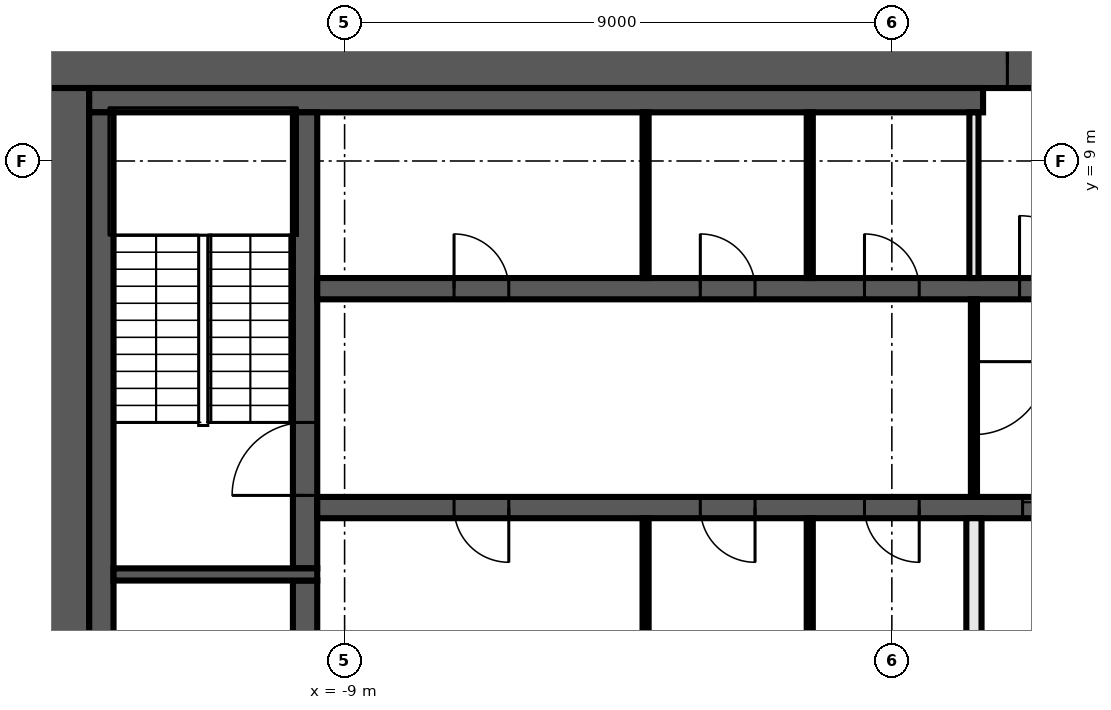
"""IFC4 building model, lengths in metres.
Left out: names, types, materials, properties, quantities, classifications, styles, units other than length and angle.
Written with IfcOpenShell. Run it as: python <this file> out.ifc"""

import sys

from ifc_helpers import new_model, si_unit, direction, frame, frame_2d, origin, place, context, subcontext, project, spatial, rectangle, extrude, element, fill, save


model = new_model("IFC4")
c1 = context("Model", 3, precision=1e-05, world=origin(), true_north=direction((0.0, 1.0)))
c2 = subcontext(c1, "Body", "Model", "MODEL_VIEW")
j1 = project(units=[si_unit("LENGTHUNIT", "METRE"), si_unit("PLANEANGLEUNIT", "RADIAN")], contexts=[c1])
p1 = place(None, origin())
s1 = spatial("IfcSite", under=j1, at=p1, CompositionType="ELEMENT")
p2 = place(p1, origin())
s2 = spatial("IfcBuilding", under=s1, at=p2, CompositionType="ELEMENT")
p3 = place(p2, frame((0.0, 0.0, 167.0)))
s3 = spatial("IfcBuildingStorey", under=s2, at=p3, CompositionType="ELEMENT", Elevation=167.0)
p4 = place(p3, frame((-14.0, 10.6, 0.0), z_axis=(0.0, 0.0, 1.0), x_axis=(1.0, 0.0, 0.0)))
e1 = element("IfcWall", 1, at=p4, inside=s3, PredefinedType="SHEAR", context=c2, shape_type="SweptSolid", body=[
    extrude(rectangle(XDim=28.0, YDim=0.8, at=frame_2d((14.0, 0.0))), origin(), (0.0, 0.0, 1.0), 3.82),
])
p5 = place(p4, frame((15.9, 0.0, 0.0)))
e2 = element("IfcOpeningElement", 2, at=p5, cuts=e1, PredefinedType="OPENING", context=c2, shape_type="SweptSolid", body=[
    extrude(rectangle(XDim=1.6, YDim=2.1, at=frame_2d((0.8, 1.05))), frame((0.0, 0.41, 0.0), z_axis=(0.0, -1.0, 0.0), x_axis=(1.0, 0.0, 0.0)), (0.0, 0.0, 1.0), 0.82),
])
p6 = place(p3, frame((-13.6, -10.2, 0.0), z_axis=(0.0, 0.0, 1.0), x_axis=(0.0, 1.0, 0.0)))
e3 = element("IfcWall", 3, at=p6, inside=s3, PredefinedType="SHEAR", context=c2, shape_type="SweptSolid", body=[
    extrude(rectangle(XDim=20.4, YDim=0.8, at=frame_2d((10.2, 0.0))), origin(), (0.0, 0.0, 1.0), 3.82),
])
p7 = place(p3, frame((-13.2, 10.0, 0.0), z_axis=(0.0, 0.0, 1.0), x_axis=(1.0, 0.0, 0.0)))
e4 = element("IfcWall", 4, at=p7, inside=s3, PredefinedType="SHEAR", context=c2, shape_type="SweptSolid", body=[
    extrude(rectangle(XDim=14.7, YDim=0.4, at=frame_2d((7.35, 0.0))), origin(), (0.0, 0.0, 1.0), 3.82),
])
p8 = place(p3, frame((-13.0, -9.8, 0.0), z_axis=(0.0, 0.0, 1.0), x_axis=(0.0, 1.0, 0.0)))
e5 = element("IfcWall", 5, at=p8, inside=s3, PredefinedType="SHEAR", context=c2, shape_type="SweptSolid", body=[
    extrude(rectangle(XDim=19.6, YDim=0.4, at=frame_2d((9.8, 0.0))), origin(), (0.0, 0.0, 1.0), 3.82),
])
p9 = place(p3, frame((-9.65, -2.1, 0.0), z_axis=(0.0, 0.0, 1.0), x_axis=(0.0, 1.0, 0.0)))
e6 = element("IfcWall", 6, at=p9, inside=s3, PredefinedType="SHEAR", context=c2, shape_type="SweptSolid", body=[
    extrude(rectangle(XDim=4.2, YDim=0.4, at=frame_2d((2.1, 0.0))), origin(), (0.0, 0.0, 1.0), 3.82),
])
p10 = place(p3, frame((-9.65, 2.3, 0.0), z_axis=(0.0, 0.0, 1.0), x_axis=(0.0, 1.0, 0.0)))
e7 = element("IfcWall", 7, at=p10, inside=s3, PredefinedType="SHEAR", context=c2, shape_type="SweptSolid", body=[
    extrude(rectangle(XDim=7.5, YDim=0.4, at=frame_2d((3.75, 0.0))), origin(), (0.0, 0.0, 1.0), 3.82),
])
p11 = place(p10, frame((1.2, 0.0, 0.0)))
e8 = element("IfcOpeningElement", 8, at=p11, cuts=e7, PredefinedType="OPENING", context=c2, shape_type="SweptSolid", body=[
    extrude(rectangle(XDim=1.2, YDim=2.1, at=frame_2d((0.6, 1.05))), frame((0.0, 0.21, 0.0), z_axis=(0.0, -1.0, 0.0), x_axis=(1.0, 0.0, 0.0)), (0.0, 0.0, 1.0), 0.42),
])
p12 = place(p3, frame((-9.45, 2.2, 0.0), z_axis=(0.0, 0.0, 1.0), x_axis=(-1.0, 0.0, 0.0)))
e9 = element("IfcWall", 9, at=p12, inside=s3, PredefinedType="SHEAR", context=c2, shape_type="SweptSolid", body=[
    extrude(rectangle(XDim=3.35, YDim=0.2, at=frame_2d((1.675, 0.0))), origin(), (0.0, 0.0, 1.0), 3.82),
])
p13 = place(p3, frame((-9.45, 6.9, 0.0), z_axis=(0.0, 0.0, 1.0), x_axis=(1.0, 0.0, 0.0)))
e10 = element("IfcWall", 10, at=p13, inside=s3, PredefinedType="SHEAR", context=c2, shape_type="SweptSolid", body=[
    extrude(rectangle(XDim=18.9, YDim=0.35, at=frame_2d((9.45, 0.0))), origin(), (0.0, 0.0, 1.0), 3.82),
])
p14 = place(p13, frame((11.55, 0.0, 0.0)))
e11 = element("IfcOpeningElement", 11, at=p14, cuts=e10, PredefinedType="OPENING", context=c2, shape_type="SweptSolid", body=[
    extrude(rectangle(XDim=1.2, YDim=2.1, at=frame_2d((0.6, 1.05))), frame((0.0, 0.185, 0.0), z_axis=(0.0, -1.0, 0.0), x_axis=(1.0, 0.0, 0.0)), (0.0, 0.0, 1.0), 0.37),
])
p15 = place(p13, frame((14.3, 0.0, 0.0)))
e12 = element("IfcOpeningElement", 12, at=p15, cuts=e10, PredefinedType="OPENING", context=c2, shape_type="SweptSolid", body=[
    extrude(rectangle(XDim=1.1, YDim=2.1, at=frame_2d((0.55, 1.05))), frame((0.0, 0.185, 0.0), z_axis=(0.0, -1.0, 0.0), x_axis=(1.0, 0.0, 0.0)), (0.0, 0.0, 1.0), 0.37),
])
p16 = place(p13, frame((17.0, 0.0, 0.0)))
e13 = element("IfcOpeningElement", 13, at=p16, cuts=e10, PredefinedType="OPENING", context=c2, shape_type="SweptSolid", body=[
    extrude(rectangle(XDim=1.1, YDim=2.1, at=frame_2d((0.55, 1.05))), frame((0.0, 0.185, 0.0), z_axis=(0.0, -1.0, 0.0), x_axis=(1.0, 0.0, 0.0)), (0.0, 0.0, 1.0), 0.37),
])
p17 = place(p13, frame((2.25, 0.0, 0.0)))
e14 = element("IfcOpeningElement", 14, at=p17, cuts=e10, PredefinedType="OPENING", context=c2, shape_type="SweptSolid", body=[
    extrude(rectangle(XDim=0.9, YDim=2.1, at=frame_2d((0.45, 1.05))), frame((0.0, 0.185, 0.0), z_axis=(0.0, -1.0, 0.0), x_axis=(1.0, 0.0, 0.0)), (0.0, 0.0, 1.0), 0.37),
])
p18 = place(p13, frame((6.3, 0.0, 0.0)))
e15 = element("IfcOpeningElement", 15, at=p18, cuts=e10, PredefinedType="OPENING", context=c2, shape_type="SweptSolid", body=[
    extrude(rectangle(XDim=0.9, YDim=2.1, at=frame_2d((0.45, 1.05))), frame((0.0, 0.185, 0.0), z_axis=(0.0, -1.0, 0.0), x_axis=(1.0, 0.0, 0.0)), (0.0, 0.0, 1.0), 0.37),
])
p19 = place(p13, frame((9.0, 0.0, 0.0)))
e16 = element("IfcOpeningElement", 16, at=p19, cuts=e10, PredefinedType="OPENING", context=c2, shape_type="SweptSolid", body=[
    extrude(rectangle(XDim=0.9, YDim=2.1, at=frame_2d((0.45, 1.05))), frame((0.0, 0.185, 0.0), z_axis=(0.0, -1.0, 0.0), x_axis=(1.0, 0.0, 0.0)), (0.0, 0.0, 1.0), 0.37),
])
p20 = place(p3, frame((9.45, 3.3, 0.0), z_axis=(0.0, 0.0, 1.0), x_axis=(-1.0, 0.0, 0.0)))
e17 = element("IfcWall", 17, at=p20, inside=s3, PredefinedType="SHEAR", context=c2, shape_type="SweptSolid", body=[
    extrude(rectangle(XDim=18.9, YDim=0.35, at=frame_2d((9.45, 0.0))), origin(), (0.0, 0.0, 1.0), 3.82),
])
p21 = place(p20, frame((6.2, 0.0, 0.0)))
e18 = element("IfcOpeningElement", 18, at=p21, cuts=e17, PredefinedType="OPENING", context=c2, shape_type="SweptSolid", body=[
    extrude(rectangle(XDim=1.1, YDim=2.1, at=frame_2d((0.55, 1.05))), frame((0.0, 0.185, 0.0), z_axis=(0.0, -1.0, 0.0), x_axis=(1.0, 0.0, 0.0)), (0.0, 0.0, 1.0), 0.37),
])
p22 = place(p20, frame((3.5, 0.0, 0.0)))
e19 = element("IfcOpeningElement", 19, at=p22, cuts=e17, PredefinedType="OPENING", context=c2, shape_type="SweptSolid", body=[
    extrude(rectangle(XDim=1.1, YDim=2.1, at=frame_2d((0.55, 1.05))), frame((0.0, 0.185, 0.0), z_axis=(0.0, -1.0, 0.0), x_axis=(1.0, 0.0, 0.0)), (0.0, 0.0, 1.0), 0.37),
])
p23 = place(p20, frame((0.9, 0.0, 0.0)))
e20 = element("IfcOpeningElement", 20, at=p23, cuts=e17, PredefinedType="OPENING", context=c2, shape_type="SweptSolid", body=[
    extrude(rectangle(XDim=0.9, YDim=2.1, at=frame_2d((0.45, 1.05))), frame((0.0, 0.185, 0.0), z_axis=(0.0, -1.0, 0.0), x_axis=(1.0, 0.0, 0.0)), (0.0, 0.0, 1.0), 0.37),
])
p24 = place(p20, frame((15.75, 0.0, 0.0)))
e21 = element("IfcOpeningElement", 21, at=p24, cuts=e17, PredefinedType="OPENING", context=c2, shape_type="SweptSolid", body=[
    extrude(rectangle(XDim=0.9, YDim=2.1, at=frame_2d((0.45, 1.05))), frame((0.0, 0.185, 0.0), z_axis=(0.0, -1.0, 0.0), x_axis=(1.0, 0.0, 0.0)), (0.0, 0.0, 1.0), 0.37),
])
p25 = place(p20, frame((11.7, 0.0, 0.0)))
e22 = element("IfcOpeningElement", 22, at=p25, cuts=e17, PredefinedType="OPENING", context=c2, shape_type="SweptSolid", body=[
    extrude(rectangle(XDim=0.9, YDim=2.1, at=frame_2d((0.45, 1.05))), frame((0.0, 0.185, 0.0), z_axis=(0.0, -1.0, 0.0), x_axis=(1.0, 0.0, 0.0)), (0.0, 0.0, 1.0), 0.37),
])
p26 = place(p20, frame((9.0, 0.0, 0.0)))
e23 = element("IfcOpeningElement", 23, at=p26, cuts=e17, PredefinedType="OPENING", context=c2, shape_type="SweptSolid", body=[
    extrude(rectangle(XDim=0.9, YDim=2.1, at=frame_2d((0.45, 1.05))), frame((0.0, 0.185, 0.0), z_axis=(0.0, -1.0, 0.0), x_axis=(1.0, 0.0, 0.0)), (0.0, 0.0, 1.0), 0.37),
])
p27 = place(p3, frame((1.35, 7.075, 0.0), z_axis=(0.0, 0.0, 1.0), x_axis=(0.0, 1.0, 0.0)))
e24 = element("IfcWall", 24, at=p27, inside=s3, PredefinedType="PARTITIONING", context=c2, shape_type="SweptSolid", body=[
    extrude(rectangle(XDim=2.725, YDim=0.15, at=frame_2d((1.363, 0.0))), origin(), (0.0, 0.0, 1.0), 3.82),
])
p28 = place(p3, frame((1.35, 6.725, 0.0), z_axis=(0.0, 0.0, 1.0), x_axis=(0.0, -1.0, 0.0)))
e25 = element("IfcWall", 25, at=p28, inside=s3, PredefinedType="PARTITIONING", context=c2, shape_type="SweptSolid", body=[
    extrude(rectangle(XDim=3.25, YDim=0.1, at=frame_2d((1.625, 0.0))), origin(), (0.0, 0.0, 1.0), 3.82),
])
p29 = place(p28, frame((1.025, 0.0, 0.0)))
e26 = element("IfcOpeningElement", 26, at=p29, cuts=e25, PredefinedType="OPENING", context=c2, shape_type="SweptSolid", body=[
    extrude(rectangle(XDim=1.2, YDim=2.1, at=frame_2d((0.6, 1.05))), frame((0.0, 0.06, 0.0), z_axis=(0.0, -1.0, 0.0), x_axis=(1.0, 0.0, 0.0)), (0.0, 0.0, 1.0), 0.12),
])
p30 = place(p3, frame((1.35, 0.4, 0.0), z_axis=(0.0, 0.0, 1.0), x_axis=(0.0, 1.0, 0.0)))
e27 = element("IfcWall", 27, at=p30, inside=s3, PredefinedType="SOLIDWALL", context=c2, shape_type="SweptSolid", body=[
    extrude(rectangle(XDim=2.725, YDim=0.25, at=frame_2d((1.363, 0.0))), origin(), (0.0, 0.0, 1.0), 3.82),
])
for number, where, z_axis, x_axis in (
    (28, (-1.35, 0.4, 0.0), (0.0, 0.0, 1.0), (0.0, 1.0, 0.0)),
    (29, (-1.35, 7.075, 0.0), (0.0, 0.0, 1.0), (0.0, 1.0, 0.0)),
    (30, (-4.05, 0.4, 0.0), (0.0, 0.0, 1.0), (0.0, 1.0, 0.0)),
    (31, (-4.05, 7.075, 0.0), (0.0, 0.0, 1.0), (0.0, 1.0, 0.0)),
):
    element("IfcWall", number, at=place(p3, frame(where, z_axis=z_axis, x_axis=x_axis)), inside=s3, PredefinedType="PARTITIONING", context=c2, shape_type="SweptSolid", body=[
        extrude(rectangle(XDim=2.725, YDim=0.1, at=frame_2d((1.363, 0.0))), origin(), (0.0, 0.0, 1.0), 3.82),
    ])
p31 = place(p5, origin())
e32 = element("IfcDoor", 32, at=p31, inside=s3, OperationType="DOUBLE_DOOR_SINGLE_SWING", PredefinedType="DOOR", context=c2, shape_type="SweptSolid", body=[
    extrude(rectangle(XDim=1.6, YDim=2.1, at=frame_2d((0.8, 1.05))), frame((0.0, 0.025, 0.0), z_axis=(0.0, -1.0, 0.0), x_axis=(1.0, 0.0, 0.0)), (0.0, 0.0, 1.0), 0.05),
])
fill(e2, e32)
p32 = place(p14, origin())
e33 = element("IfcDoor", 33, at=p32, inside=s3, OperationType="SINGLE_SWING_LEFT", PredefinedType="DOOR", context=c2, shape_type="SweptSolid", body=[
    extrude(rectangle(XDim=1.2, YDim=2.1, at=frame_2d((0.6, 1.05))), frame((0.0, 0.025, 0.0), z_axis=(0.0, -1.0, 0.0), x_axis=(1.0, 0.0, 0.0)), (0.0, 0.0, 1.0), 0.05),
])
fill(e11, e33)
p33 = place(p21, origin())
e34 = element("IfcDoor", 34, at=p33, inside=s3, OperationType="DOUBLE_DOOR_SLIDING", PredefinedType="DOOR", context=c2, shape_type="SweptSolid", body=[
    extrude(rectangle(XDim=1.1, YDim=2.1, at=frame_2d((0.55, 1.05))), frame((0.0, 0.025, 0.0), z_axis=(0.0, -1.0, 0.0), x_axis=(1.0, 0.0, 0.0)), (0.0, 0.0, 1.0), 0.05),
])
fill(e18, e34)
p34 = place(p17, origin())
e35 = element("IfcDoor", 35, at=p34, inside=s3, OperationType="SINGLE_SWING_RIGHT", PredefinedType="DOOR", context=c2, shape_type="SweptSolid", body=[
    extrude(rectangle(XDim=0.9, YDim=2.1, at=frame_2d((0.45, 1.05))), frame((0.0, 0.025, 0.0), z_axis=(0.0, -1.0, 0.0), x_axis=(1.0, 0.0, 0.0)), (0.0, 0.0, 1.0), 0.05),
])
fill(e14, e35)
p35 = place(p18, origin())
e36 = element("IfcDoor", 36, at=p35, inside=s3, OperationType="SINGLE_SWING_LEFT", PredefinedType="DOOR", context=c2, shape_type="SweptSolid", body=[
    extrude(rectangle(XDim=0.9, YDim=2.1, at=frame_2d((0.45, 1.05))), frame((0.0, 0.025, 0.0), z_axis=(0.0, -1.0, 0.0), x_axis=(1.0, 0.0, 0.0)), (0.0, 0.0, 1.0), 0.05),
])
fill(e15, e36)
p36 = place(p19, origin())
e37 = element("IfcDoor", 37, at=p36, inside=s3, OperationType="SINGLE_SWING_RIGHT", PredefinedType="DOOR", context=c2, shape_type="SweptSolid", body=[
    extrude(rectangle(XDim=0.9, YDim=2.1, at=frame_2d((0.45, 1.05))), frame((0.0, 0.025, 0.0), z_axis=(0.0, -1.0, 0.0), x_axis=(1.0, 0.0, 0.0)), (0.0, 0.0, 1.0), 0.05),
])
fill(e16, e37)
p37 = place(p24, origin())
e38 = element("IfcDoor", 38, at=p37, inside=s3, OperationType="SINGLE_SWING_LEFT", PredefinedType="DOOR", context=c2, shape_type="SweptSolid", body=[
    extrude(rectangle(XDim=0.9, YDim=2.1, at=frame_2d((0.45, 1.05))), frame((0.0, 0.025, 0.0), z_axis=(0.0, -1.0, 0.0), x_axis=(1.0, 0.0, 0.0)), (0.0, 0.0, 1.0), 0.05),
])
fill(e21, e38)
p38 = place(p25, origin())
e39 = element("IfcDoor", 39, at=p38, inside=s3, OperationType="SINGLE_SWING_RIGHT", PredefinedType="DOOR", context=c2, shape_type="SweptSolid", body=[
    extrude(rectangle(XDim=0.9, YDim=2.1, at=frame_2d((0.45, 1.05))), frame((0.0, 0.025, 0.0), z_axis=(0.0, -1.0, 0.0), x_axis=(1.0, 0.0, 0.0)), (0.0, 0.0, 1.0), 0.05),
])
fill(e22, e39)
p39 = place(p26, origin())
e40 = element("IfcDoor", 40, at=p39, inside=s3, OperationType="SINGLE_SWING_LEFT", PredefinedType="DOOR", context=c2, shape_type="SweptSolid", body=[
    extrude(rectangle(XDim=0.9, YDim=2.1, at=frame_2d((0.45, 1.05))), frame((0.0, 0.025, 0.0), z_axis=(0.0, -1.0, 0.0), x_axis=(1.0, 0.0, 0.0)), (0.0, 0.0, 1.0), 0.05),
])
fill(e23, e40)
p40 = place(p11, origin())
e41 = element("IfcDoor", 41, at=p40, inside=s3, OperationType="SINGLE_SWING_RIGHT", PredefinedType="DOOR", context=c2, shape_type="SweptSolid", body=[
    extrude(rectangle(XDim=1.2, YDim=2.1, at=frame_2d((0.6, 1.05))), frame((0.0, 0.025, 0.0), z_axis=(0.0, -1.0, 0.0), x_axis=(1.0, 0.0, 0.0)), (0.0, 0.0, 1.0), 0.05),
])
fill(e8, e41)
p41 = place(p29, origin())
e42 = element("IfcDoor", 42, at=p41, inside=s3, OperationType="SINGLE_SWING_LEFT", PredefinedType="DOOR", context=c2, shape_type="SweptSolid", body=[
    extrude(rectangle(XDim=1.2, YDim=2.1, at=frame_2d((0.6, 1.05))), frame((0.0, 0.025, 0.0), z_axis=(0.0, -1.0, 0.0), x_axis=(1.0, 0.0, 0.0)), (0.0, 0.0, 1.0), 0.05),
])
fill(e26, e42)
save(model, sys.argv[1])
